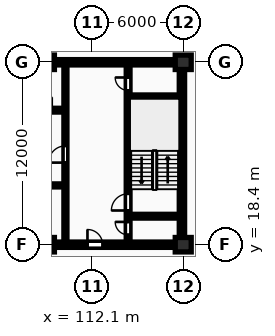
"""IFC4 building model, lengths in metres.
Left out: names, types, materials, properties, quantities, classifications, styles, units other than length and angle.
Written with IfcOpenShell. Run it as: python <this file> out.ifc"""

import sys

from ifc_helpers import new_model, si_unit, direction, frame, frame_2d, origin, origin_2d, place, context, subcontext, project, spatial, rectangle, extrude, element, fill, save


model = new_model("IFC4")
c1 = context("Model", 3, precision=1e-05, world=origin(), true_north=direction((0.0, 1.0)))
c2 = subcontext(c1, "Body", "Model", "MODEL_VIEW")
j1 = project(units=[si_unit("LENGTHUNIT", "METRE"), si_unit("PLANEANGLEUNIT", "RADIAN")], contexts=[c1])
p1 = place(None, origin())
s1 = spatial("IfcSite", under=j1, at=p1, CompositionType="ELEMENT")
p2 = place(p1, origin())
s2 = spatial("IfcBuilding", under=s1, at=p2, CompositionType="ELEMENT")
p3 = place(p2, frame((0.0, 0.0, -10.8)))
s3 = spatial("IfcBuildingStorey", under=s2, at=p3, CompositionType="ELEMENT", Elevation=-10.8)
for number, where, z_axis, x_axis in (
    (1, (109.1, 18.4, -0.45), (0.0, 0.0, 1.0), (1.0, 0.0, 0.0)),
    (2, (109.1, 30.4, -0.45), (0.0, 0.0, 1.0), (1.0, 0.0, 0.0)),
    (3, (118.1, 18.4, -0.45), (0.0, 0.0, 1.0), (1.0, 0.0, 0.0)),
    (4, (118.1, 30.4, -0.45), (0.0, 0.0, 1.0), (1.0, 0.0, 0.0)),
):
    element("IfcColumn", number, at=place(p3, frame(where, z_axis=z_axis, x_axis=x_axis)), inside=s3, PredefinedType="COLUMN", context=c2, shape_type="SweptSolid", body=[
        extrude(rectangle(XDim=1.05, YDim=0.95, at=origin_2d()), origin(), (0.0, 0.0, 1.0), 4.05),
    ])
p4 = place(p3, frame((81.925, 30.4, 0.0), z_axis=(0.0, 0.0, 1.0), x_axis=(1.0, 0.0, 0.0)))
e5 = element("IfcWall", 5, at=p4, inside=s3, PredefinedType="SHEAR", context=c2, shape_type="SweptSolid", body=[
    extrude(rectangle(XDim=36.265, YDim=0.35, at=frame_2d((18.132, 0.0))), origin(), (0.0, 0.0, 1.0), 3.6),
])
p5 = place(p3, frame((118.015, 18.575, 0.0), z_axis=(0.0, 0.0, 1.0), x_axis=(0.0, 1.0, 0.0)))
e6 = element("IfcWall", 6, at=p5, inside=s3, PredefinedType="SHEAR", context=c2, shape_type="SweptSolid", body=[
    extrude(rectangle(XDim=11.65, YDim=0.35, at=frame_2d((5.825, 0.0))), origin(), (0.0, 0.0, 1.0), 3.6),
])
p6 = place(p3, frame((81.925, 18.4, 0.0), z_axis=(0.0, 0.0, 1.0), x_axis=(1.0, 0.0, 0.0)))
e7 = element("IfcWall", 7, at=p6, inside=s3, PredefinedType="SHEAR", context=c2, shape_type="SweptSolid", body=[
    extrude(rectangle(XDim=36.265, YDim=0.35, at=frame_2d((18.132, 0.0))), origin(), (0.0, 0.0, 1.0), 3.6),
])
p7 = place(p6, frame((5.675, 0.0, 0.0)))
e8 = element("IfcOpeningElement", 8, at=p7, cuts=e7, PredefinedType="OPENING", context=c2, shape_type="SweptSolid", body=[
    extrude(rectangle(XDim=1.0, YDim=2.15, at=frame_2d((0.5, 1.075))), frame((0.0, 0.185, 0.0), z_axis=(0.0, -1.0, 0.0), x_axis=(1.0, 0.0, 0.0)), (0.0, 0.0, 1.0), 0.37),
])
p8 = place(p6, frame((21.925, 0.0, 0.0)))
e9 = element("IfcOpeningElement", 9, at=p8, cuts=e7, PredefinedType="OPENING", context=c2, shape_type="SweptSolid", body=[
    extrude(rectangle(XDim=1.5, YDim=2.2, at=frame_2d((0.75, 1.1))), frame((0.0, 0.185, 0.0), z_axis=(0.0, -1.0, 0.0), x_axis=(1.0, 0.0, 0.0)), (0.0, 0.0, 1.0), 0.37),
])
p9 = place(p6, frame((29.875, 0.0, 0.0)))
e10 = element("IfcOpeningElement", 10, at=p9, cuts=e7, PredefinedType="OPENING", context=c2, shape_type="SweptSolid", body=[
    extrude(rectangle(XDim=1.0, YDim=2.15, at=frame_2d((0.5, 1.075))), frame((0.0, 0.185, 0.0), z_axis=(0.0, -1.0, 0.0), x_axis=(1.0, 0.0, 0.0)), (0.0, 0.0, 1.0), 0.37),
])
p10 = place(p3, frame((99.68, 27.25, 0.0), z_axis=(0.0, 0.0, 1.0), x_axis=(1.0, 0.0, 0.0)))
e11 = element("IfcWall", 11, at=p10, inside=s3, PredefinedType="SHEAR", context=c2, shape_type="SweptSolid", body=[
    extrude(rectangle(XDim=10.54, YDim=0.25, at=frame_2d((5.27, 0.0))), origin(), (0.0, 0.0, 1.0), 3.6),
])
p11 = place(p10, frame((8.92, 0.0, 0.0)))
e12 = element("IfcOpeningElement", 12, at=p11, cuts=e11, PredefinedType="OPENING", context=c2, shape_type="SweptSolid", body=[
    extrude(rectangle(XDim=0.85, YDim=2.05, at=frame_2d((0.425, 1.025))), frame((0.0, 0.135, 0.0), z_axis=(0.0, -1.0, 0.0), x_axis=(1.0, 0.0, 0.0)), (0.0, 0.0, 1.0), 0.27),
])
p12 = place(p3, frame((91.08, 22.3, 0.0), z_axis=(0.0, 0.0, 1.0), x_axis=(1.0, 0.0, 0.0)))
e13 = element("IfcWall", 13, at=p12, inside=s3, PredefinedType="PARTITIONING", context=c2, shape_type="SweptSolid", body=[
    extrude(rectangle(XDim=19.14, YDim=0.2, at=frame_2d((9.57, 0.0))), origin(), (0.0, 0.0, 1.0), 3.3),
])
p13 = place(p12, frame((1.15, 0.0, 0.0)))
e14 = element("IfcOpeningElement", 14, at=p13, cuts=e13, PredefinedType="OPENING", context=c2, shape_type="SweptSolid", body=[
    extrude(rectangle(XDim=0.85, YDim=2.05, at=frame_2d((0.425, 1.025))), frame((0.0, 0.11, 0.0), z_axis=(0.0, -1.0, 0.0), x_axis=(1.0, 0.0, 0.0)), (0.0, 0.0, 1.0), 0.22),
])
p14 = place(p12, frame((3.2, 0.0, 0.0)))
e15 = element("IfcOpeningElement", 15, at=p14, cuts=e13, PredefinedType="OPENING", context=c2, shape_type="SweptSolid", body=[
    extrude(rectangle(XDim=0.85, YDim=2.05, at=frame_2d((0.425, 1.025))), frame((0.0, 0.11, 0.0), z_axis=(0.0, -1.0, 0.0), x_axis=(1.0, 0.0, 0.0)), (0.0, 0.0, 1.0), 0.22),
])
p15 = place(p12, frame((12.72, 0.0, 0.0)))
e16 = element("IfcOpeningElement", 16, at=p15, cuts=e13, PredefinedType="OPENING", context=c2, shape_type="SweptSolid", body=[
    extrude(rectangle(XDim=1.5, YDim=2.2, at=frame_2d((0.75, 1.1))), frame((0.0, 0.11, 0.0), z_axis=(0.0, -1.0, 0.0), x_axis=(1.0, 0.0, 0.0)), (0.0, 0.0, 1.0), 0.22),
])
p16 = place(p12, frame((5.52, 0.0, 0.0)))
e17 = element("IfcOpeningElement", 17, at=p16, cuts=e13, PredefinedType="OPENING", context=c2, shape_type="SweptSolid", body=[
    extrude(rectangle(XDim=0.88, YDim=2.06, at=frame_2d((0.44, 1.03))), frame((0.0, 0.11, 0.0), z_axis=(0.0, -1.0, 0.0), x_axis=(1.0, 0.0, 0.0)), (0.0, 0.0, 1.0), 0.22),
])
p17 = place(p12, frame((7.67, 0.0, 0.0)))
e18 = element("IfcOpeningElement", 18, at=p17, cuts=e13, PredefinedType="OPENING", context=c2, shape_type="SweptSolid", body=[
    extrude(rectangle(XDim=0.88, YDim=2.06, at=frame_2d((0.44, 1.03))), frame((0.0, 0.11, 0.0), z_axis=(0.0, -1.0, 0.0), x_axis=(1.0, 0.0, 0.0)), (0.0, 0.0, 1.0), 0.22),
])
p18 = place(p12, frame((10.27, 0.0, 0.0)))
e19 = element("IfcOpeningElement", 19, at=p18, cuts=e13, PredefinedType="OPENING", context=c2, shape_type="SweptSolid", body=[
    extrude(rectangle(XDim=0.85, YDim=2.05, at=frame_2d((0.425, 1.025))), frame((0.0, 0.11, 0.0), z_axis=(0.0, -1.0, 0.0), x_axis=(1.0, 0.0, 0.0)), (0.0, 0.0, 1.0), 0.22),
])
p19 = place(p12, frame((15.92, 0.0, 0.0)))
e20 = element("IfcOpeningElement", 20, at=p19, cuts=e13, PredefinedType="OPENING", context=c2, shape_type="SweptSolid", body=[
    extrude(rectangle(XDim=0.96, YDim=2.1, at=frame_2d((0.48, 1.05))), frame((0.0, 0.11, 0.0), z_axis=(0.0, -1.0, 0.0), x_axis=(1.0, 0.0, 0.0)), (0.0, 0.0, 1.0), 0.22),
])
p20 = place(p3, frame((110.35, 18.6, 0.0), z_axis=(0.0, 0.0, 1.0), x_axis=(0.0, 1.0, 0.0)))
e21 = element("IfcWall", 21, at=p20, inside=s3, PredefinedType="PARTITIONING", context=c2, shape_type="SweptSolid", body=[
    extrude(rectangle(XDim=11.6, YDim=0.2, at=frame_2d((5.8, 0.0))), origin(), (0.0, 0.0, 1.0), 3.3),
])
p21 = place(p20, frame((5.2, 0.0, 0.0)))
e22 = element("IfcOpeningElement", 22, at=p21, cuts=e21, PredefinedType="OPENING", context=c2, shape_type="SweptSolid", body=[
    extrude(rectangle(XDim=1.1, YDim=2.15, at=frame_2d((0.55, 1.075))), frame((0.0, 0.11, 0.0), z_axis=(0.0, -1.0, 0.0), x_axis=(1.0, 0.0, 0.0)), (0.0, 0.0, 1.0), 0.22),
])
p22 = place(p3, frame((114.475, 18.6, 0.0), z_axis=(0.0, 0.0, 1.0), x_axis=(0.0, 1.0, 0.0)))
e23 = element("IfcWall", 23, at=p22, inside=s3, PredefinedType="SHEAR", context=c2, shape_type="SweptSolid", body=[
    extrude(rectangle(XDim=11.6, YDim=0.25, at=frame_2d((5.8, 0.0))), origin(), (0.0, 0.0, 1.0), 3.6),
])
p23 = place(p22, frame((0.45, 0.0, 0.0)))
e24 = element("IfcOpeningElement", 24, at=p23, cuts=e23, PredefinedType="OPENING", context=c2, shape_type="SweptSolid", body=[
    extrude(rectangle(XDim=0.85, YDim=2.05, at=frame_2d((0.425, 1.025))), frame((0.0, 0.135, 0.0), z_axis=(0.0, -1.0, 0.0), x_axis=(1.0, 0.0, 0.0)), (0.0, 0.0, 1.0), 0.27),
])
p24 = place(p22, frame((2.05, 0.0, 0.0)))
e25 = element("IfcOpeningElement", 25, at=p24, cuts=e23, PredefinedType="OPENING", context=c2, shape_type="SweptSolid", body=[
    extrude(rectangle(XDim=1.1, YDim=2.1, at=frame_2d((0.55, 1.05))), frame((0.0, 0.135, 0.0), z_axis=(0.0, -1.0, 0.0), x_axis=(1.0, 0.0, 0.0)), (0.0, 0.0, 1.0), 0.27),
])
p25 = place(p22, frame((9.95, 0.0, 0.0)))
e26 = element("IfcOpeningElement", 26, at=p25, cuts=e23, PredefinedType="OPENING", context=c2, shape_type="SweptSolid", body=[
    extrude(rectangle(XDim=0.85, YDim=2.05, at=frame_2d((0.425, 1.025))), frame((0.0, 0.135, 0.0), z_axis=(0.0, -1.0, 0.0), x_axis=(1.0, 0.0, 0.0)), (0.0, 0.0, 1.0), 0.27),
])
for number, where, z_axis, x_axis in (
    (27, (114.6, 20.275, 0.0), (0.0, 0.0, 1.0), (1.0, 0.0, 0.0)),
    (28, (114.6, 28.125, 0.0), (0.0, 0.0, 1.0), (1.0, 0.0, 0.0)),
):
    element("IfcWall", number, at=place(p3, frame(where, z_axis=z_axis, x_axis=x_axis)), inside=s3, PredefinedType="SHEAR", context=c2, shape_type="SweptSolid", body=[
        extrude(rectangle(XDim=3.24, YDim=0.25, at=frame_2d((1.62, 0.0))), origin(), (0.0, 0.0, 1.0), 3.6),
    ])
p26 = place(p9, origin())
e29 = element("IfcDoor", 29, at=p26, inside=s3, OperationType="SINGLE_SWING_LEFT", PredefinedType="DOOR", context=c2, shape_type="SweptSolid", body=[
    extrude(rectangle(XDim=1.0, YDim=2.15, at=frame_2d((0.5, 1.075))), frame((0.0, 0.025, 0.0), z_axis=(0.0, -1.0, 0.0), x_axis=(1.0, 0.0, 0.0)), (0.0, 0.0, 1.0), 0.05),
])
fill(e10, e29)
p27 = place(p21, origin())
e30 = element("IfcDoor", 30, at=p27, inside=s3, OperationType="SINGLE_SWING_LEFT", PredefinedType="DOOR", context=c2, shape_type="SweptSolid", body=[
    extrude(rectangle(XDim=1.1, YDim=2.15, at=frame_2d((0.55, 1.075))), frame((0.0, 0.025, 0.0), z_axis=(0.0, -1.0, 0.0), x_axis=(1.0, 0.0, 0.0)), (0.0, 0.0, 1.0), 0.05),
])
fill(e22, e30)
p28 = place(p23, origin())
e31 = element("IfcDoor", 31, at=p28, inside=s3, OperationType="SINGLE_SWING_RIGHT", PredefinedType="DOOR", context=c2, shape_type="SweptSolid", body=[
    extrude(rectangle(XDim=0.85, YDim=2.05, at=frame_2d((0.425, 1.025))), frame((0.0, 0.025, 0.0), z_axis=(0.0, -1.0, 0.0), x_axis=(1.0, 0.0, 0.0)), (0.0, 0.0, 1.0), 0.05),
])
fill(e24, e31)
p29 = place(p24, origin())
e32 = element("IfcDoor", 32, at=p29, inside=s3, OperationType="SINGLE_SWING_LEFT", PredefinedType="DOOR", context=c2, shape_type="SweptSolid", body=[
    extrude(rectangle(XDim=1.1, YDim=2.1, at=frame_2d((0.55, 1.05))), frame((0.0, 0.025, 0.0), z_axis=(0.0, -1.0, 0.0), x_axis=(1.0, 0.0, 0.0)), (0.0, 0.0, 1.0), 0.05),
])
fill(e25, e32)
p30 = place(p25, origin())
e33 = element("IfcDoor", 33, at=p30, inside=s3, OperationType="SINGLE_SWING_RIGHT", PredefinedType="DOOR", context=c2, shape_type="SweptSolid", body=[
    extrude(rectangle(XDim=0.85, YDim=2.05, at=frame_2d((0.425, 1.025))), frame((0.0, 0.025, 0.0), z_axis=(0.0, -1.0, 0.0), x_axis=(1.0, 0.0, 0.0)), (0.0, 0.0, 1.0), 0.05),
])
fill(e26, e33)
save(model, sys.argv[1])
